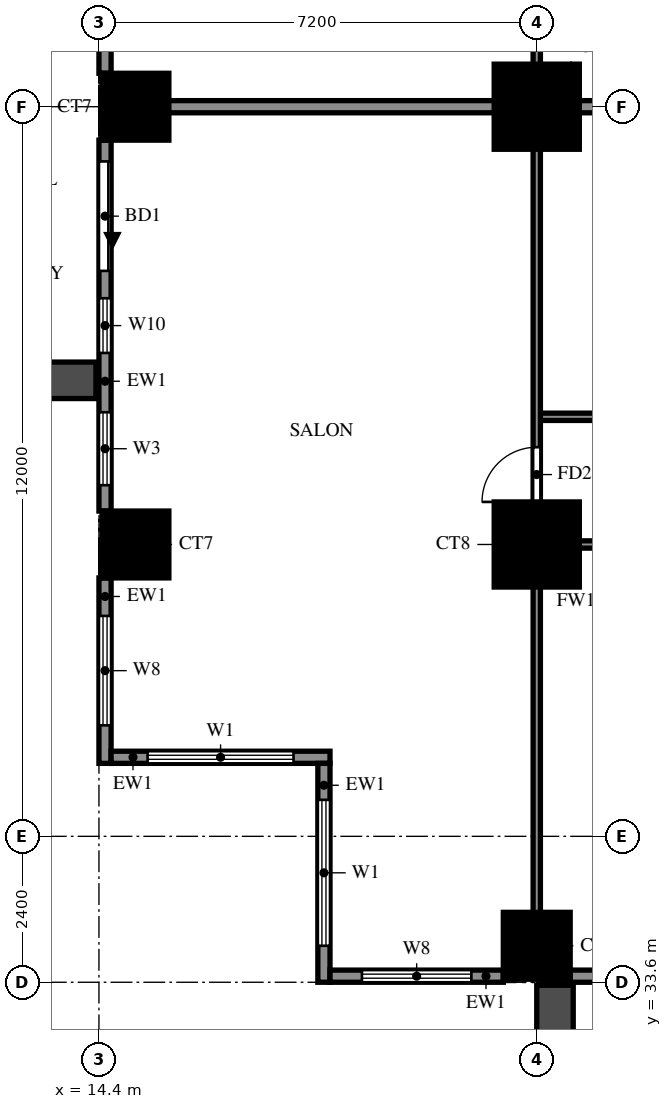
"""IFC4 building model, lengths in metres.
Left out: names, types, materials, properties, quantities, classifications, styles, units other than length and angle.
Written with IfcOpenShell. Run it as: python <this file> out.ifc"""

import sys

from ifc_helpers import new_model, si_unit, direction, frame, frame_2d, origin, origin_2d, place, context, subcontext, project, spatial, rectangle, extrude, source, transform, mapped, element, fill, save


model = new_model("IFC4")
c1 = context("Model", 3, precision=1e-05, world=origin(), true_north=direction((0.0, 1.0)))
c2 = subcontext(c1, "Body", "Model", "MODEL_VIEW")
j1 = project(units=[si_unit("LENGTHUNIT", "METRE"), si_unit("PLANEANGLEUNIT", "RADIAN")], contexts=[c1])
p1 = place(None, origin())
s1 = spatial("IfcSite", under=j1, at=p1, CompositionType="ELEMENT")
p2 = place(p1, origin())
s2 = spatial("IfcBuilding", under=s1, at=p2, CompositionType="ELEMENT")
p3 = place(p2, frame((0.0, 0.0, 44.5)))
s3 = spatial("IfcBuildingStorey", under=s2, at=p3, CompositionType="ELEMENT", Elevation=44.5)
m1 = source(origin(), c2, "Body", "SweptSolid", [
    extrude(rectangle(XDim=1.1, YDim=1.1, at=origin_2d()), origin(), (0.0, 0.0, 1.0), 3.18),
])
for number, where, z_axis, x_axis in (
    (1, (21.6, 34.2, 0.0), (0.0, 0.0, 1.0), (1.0, 0.0, 0.0)),
    (2, (15.0, 40.8, 0.0), (0.0, 0.0, 1.0), (1.0, 0.0, 0.0)),
):
    element("IfcColumn", number, at=place(p3, frame(where, z_axis=z_axis, x_axis=x_axis)), inside=s3, PredefinedType="COLUMN", context=c2, shape_type="MappedRepresentation", body=[
        mapped(m1, transform((0.0, 0.0, 0.0))),
    ])
m2 = source(origin(), c2, "Body", "SweptSolid", [
    extrude(rectangle(XDim=1.4, YDim=1.4, at=origin_2d()), origin(), (0.0, 0.0, 1.0), 3.18),
])
p4 = place(p3, frame((21.6, 40.8, 0.0), z_axis=(0.0, 0.0, 1.0), x_axis=(1.0, 0.0, 0.0)))
e3 = element("IfcColumn", 3, at=p4, inside=s3, PredefinedType="COLUMN", context=c2, shape_type="MappedRepresentation", body=[
    mapped(m2, transform((0.0, 0.0, 0.0))),
])
p5 = place(p3, frame((15.0, 48.0, 0.0), z_axis=(0.0, 0.0, 1.0), x_axis=(1.0, 0.0, 0.0)))
e4 = element("IfcColumn", 4, at=p5, inside=s3, PredefinedType="COLUMN", context=c2, shape_type="MappedRepresentation", body=[
    mapped(m1, transform((0.0, 0.0, 0.0))),
])
p6 = place(p3, frame((21.6, 48.0, 0.0), z_axis=(0.0, 0.0, 1.0), x_axis=(1.0, 0.0, 0.0)))
e5 = element("IfcColumn", 5, at=p6, inside=s3, PredefinedType="COLUMN", context=c2, shape_type="MappedRepresentation", body=[
    mapped(m2, transform((0.0, 0.0, 0.0))),
])
p7 = place(p3, frame((14.5, 54.65, 0.0), z_axis=(0.0, 0.0, 1.0), x_axis=(0.0, -1.0, 0.0)))
e6 = element("IfcWall", 6, at=p7, inside=s3, PredefinedType="SOLIDWALL", context=c2, shape_type="SweptSolid", body=[
    extrude(rectangle(XDim=6.1, YDim=0.2, at=frame_2d((3.05, 0.0))), origin(), (0.0, 0.0, 1.0), 3.18),
])
p8 = place(p7, frame((3.2, 0.0, 0.6)))
e7 = element("IfcOpeningElement", 7, at=p8, cuts=e6, PredefinedType="OPENING", context=c2, shape_type="SweptSolid", body=[
    extrude(rectangle(XDim=0.9, YDim=2.4, at=frame_2d((0.45, 1.2))), frame((0.0, 0.11, 0.0), z_axis=(0.0, -1.0, 0.0), x_axis=(1.0, 0.0, 0.0)), (0.0, 0.0, 1.0), 0.22),
])
p9 = place(p7, frame((0.725, 0.0, 0.6)))
e8 = element("IfcOpeningElement", 8, at=p9, cuts=e6, PredefinedType="OPENING", context=c2, shape_type="SweptSolid", body=[
    extrude(rectangle(XDim=1.8, YDim=2.4, at=frame_2d((0.9, 1.2))), frame((0.0, 0.11, 0.0), z_axis=(0.0, -1.0, 0.0), x_axis=(1.0, 0.0, 0.0)), (0.0, 0.0, 1.0), 0.22),
])
p10 = place(p3, frame((14.5, 47.45, 0.0), z_axis=(0.0, 0.0, 1.0), x_axis=(0.0, -1.0, 0.0)))
e9 = element("IfcWall", 9, at=p10, inside=s3, PredefinedType="SOLIDWALL", context=c2, shape_type="SweptSolid", body=[
    extrude(rectangle(XDim=6.1, YDim=0.2, at=frame_2d((3.05, 0.0))), origin(), (0.0, 0.0, 1.0), 3.18),
])
p11 = place(p10, frame((0.35, 0.0, 0.0)))
e10 = element("IfcOpeningElement", 10, at=p11, cuts=e9, PredefinedType="OPENING", context=c2, shape_type="SweptSolid", body=[
    extrude(rectangle(XDim=1.8, YDim=2.4, at=frame_2d((0.9, 1.2))), frame((0.0, 0.11, 0.0), z_axis=(0.0, -1.0, 0.0), x_axis=(1.0, 0.0, 0.0)), (0.0, 0.0, 1.0), 0.22),
])
p12 = place(p10, frame((2.6, 0.0, 0.6)))
e11 = element("IfcOpeningElement", 11, at=p12, cuts=e9, PredefinedType="OPENING", context=c2, shape_type="SweptSolid", body=[
    extrude(rectangle(XDim=0.9, YDim=2.4, at=frame_2d((0.45, 1.2))), frame((0.0, 0.11, 0.0), z_axis=(0.0, -1.0, 0.0), x_axis=(1.0, 0.0, 0.0)), (0.0, 0.0, 1.0), 0.22),
])
p13 = place(p10, frame((4.475, 0.0, 0.6)))
e12 = element("IfcOpeningElement", 12, at=p13, cuts=e9, PredefinedType="OPENING", context=c2, shape_type="SweptSolid", body=[
    extrude(rectangle(XDim=1.2, YDim=2.4, at=frame_2d((0.6, 1.2))), frame((0.0, 0.11, 0.0), z_axis=(0.0, -1.0, 0.0), x_axis=(1.0, 0.0, 0.0)), (0.0, 0.0, 1.0), 0.22),
])
p14 = place(p3, frame((14.5, 40.25, 0.0), z_axis=(0.0, 0.0, 1.0), x_axis=(0.0, -1.0, 0.0)))
e13 = element("IfcWall", 13, at=p14, inside=s3, PredefinedType="SOLIDWALL", context=c2, shape_type="SweptSolid", body=[
    extrude(rectangle(XDim=3.05, YDim=0.2, at=frame_2d((1.525, 0.0))), origin(), (0.0, 0.0, 1.0), 3.18),
])
p15 = place(p14, frame((0.625, 0.0, 0.6)))
e14 = element("IfcOpeningElement", 14, at=p15, cuts=e13, PredefinedType="OPENING", context=c2, shape_type="SweptSolid", body=[
    extrude(rectangle(XDim=1.8, YDim=2.4, at=frame_2d((0.9, 1.2))), frame((0.0, 0.11, 0.0), z_axis=(0.0, -1.0, 0.0), x_axis=(1.0, 0.0, 0.0)), (0.0, 0.0, 1.0), 0.22),
])
p16 = place(p3, frame((14.6, 37.3, 0.0), z_axis=(0.0, 0.0, 1.0), x_axis=(1.0, 0.0, 0.0)))
e15 = element("IfcWall", 15, at=p16, inside=s3, PredefinedType="SOLIDWALL", context=c2, shape_type="SweptSolid", body=[
    extrude(rectangle(XDim=3.6, YDim=0.2, at=frame_2d((1.8, 0.0))), origin(), (0.0, 0.0, 1.0), 3.18),
])
p17 = place(p16, frame((0.6, 0.0, 0.6)))
e16 = element("IfcOpeningElement", 16, at=p17, cuts=e15, PredefinedType="OPENING", context=c2, shape_type="SweptSolid", body=[
    extrude(rectangle(XDim=2.4, YDim=2.4, at=frame_2d((1.2, 1.2))), frame((0.0, 0.11, 0.0), z_axis=(0.0, -1.0, 0.0), x_axis=(1.0, 0.0, 0.0)), (0.0, 0.0, 1.0), 0.22),
])
p18 = place(p3, frame((18.1, 37.2, 0.0), z_axis=(0.0, 0.0, 1.0), x_axis=(0.0, -1.0, 0.0)))
e17 = element("IfcWall", 17, at=p18, inside=s3, PredefinedType="SOLIDWALL", context=c2, shape_type="SweptSolid", body=[
    extrude(rectangle(XDim=3.6, YDim=0.2, at=frame_2d((1.8, 0.0))), origin(), (0.0, 0.0, 1.0), 3.18),
])
p19 = place(p18, frame((0.6, 0.0, 0.6)))
e18 = element("IfcOpeningElement", 18, at=p19, cuts=e17, PredefinedType="OPENING", context=c2, shape_type="SweptSolid", body=[
    extrude(rectangle(XDim=2.4, YDim=2.4, at=frame_2d((1.2, 1.2))), frame((0.0, 0.11, 0.0), z_axis=(0.0, -1.0, 0.0), x_axis=(1.0, 0.0, 0.0)), (0.0, 0.0, 1.0), 0.22),
])
p20 = place(p3, frame((18.2, 33.7, 0.0), z_axis=(0.0, 0.0, 1.0), x_axis=(1.0, 0.0, 0.0)))
e19 = element("IfcWall", 19, at=p20, inside=s3, PredefinedType="SOLIDWALL", context=c2, shape_type="SweptSolid", body=[
    extrude(rectangle(XDim=2.85, YDim=0.2, at=frame_2d((1.425, 0.0))), origin(), (0.0, 0.0, 1.0), 3.18),
])
p21 = place(p20, frame((0.525, 0.0, 0.6)))
e20 = element("IfcOpeningElement", 20, at=p21, cuts=e19, PredefinedType="OPENING", context=c2, shape_type="SweptSolid", body=[
    extrude(rectangle(XDim=1.8, YDim=2.4, at=frame_2d((0.9, 1.2))), frame((0.0, 0.11, 0.0), z_axis=(0.0, -1.0, 0.0), x_axis=(1.0, 0.0, 0.0)), (0.0, 0.0, 1.0), 0.22),
])
p22 = place(p3, frame((22.15, 33.7, 0.0), z_axis=(0.0, 0.0, 1.0), x_axis=(1.0, 0.0, 0.0)))
e21 = element("IfcWall", 21, at=p22, inside=s3, PredefinedType="SOLIDWALL", context=c2, shape_type="SweptSolid", body=[
    extrude(rectangle(XDim=6.1, YDim=0.2, at=frame_2d((3.05, 0.0))), origin(), (0.0, 0.0, 1.0), 3.18),
])
p23 = place(p22, frame((0.95, 0.0, 0.0)))
e22 = element("IfcOpeningElement", 22, at=p23, cuts=e21, PredefinedType="OPENING", context=c2, shape_type="SweptSolid", body=[
    extrude(rectangle(XDim=1.8, YDim=2.4, at=frame_2d((0.9, 1.2))), frame((0.0, 0.11, 0.0), z_axis=(0.0, -1.0, 0.0), x_axis=(1.0, 0.0, 0.0)), (0.0, 0.0, 1.0), 0.22),
])
p24 = place(p22, frame((4.025, 0.0, 1.5)))
e23 = element("IfcOpeningElement", 23, at=p24, cuts=e21, PredefinedType="OPENING", context=c2, shape_type="SweptSolid", body=[
    extrude(rectangle(XDim=0.9, YDim=0.9, at=frame_2d((0.45, 0.45))), frame((0.0, 0.11, 0.0), z_axis=(0.0, -1.0, 0.0), x_axis=(1.0, 0.0, 0.0)), (0.0, 0.0, 1.0), 0.22),
])
for number, where, z_axis, x_axis in (
    (24, (14.35, 43.5, 0.0), (0.0, 0.0, 1.0), (-1.0, 0.0, 0.0)),
    (25, (21.9, 33.55, 0.0), (0.0, 0.0, 1.0), (0.0, -1.0, 0.0)),
):
    element("IfcWall", number, at=place(p3, frame(where, z_axis=z_axis, x_axis=x_axis)), inside=s3, PredefinedType="SOLIDWALL", context=c2, shape_type="SweptSolid", body=[
        extrude(rectangle(XDim=2.65, YDim=0.6, at=frame_2d((1.325, 0.0))), origin(), (0.0, 0.0, 1.0), 2.85),
    ])
p25 = place(p3, frame((14.525, 48.0, 0.0), z_axis=(0.0, 0.0, 1.0), x_axis=(1.0, 0.0, 0.0)))
e26 = element("IfcWall", 26, at=p25, inside=s3, PredefinedType="SOLIDWALL", context=c2, shape_type="SweptSolid", body=[
    extrude(rectangle(XDim=19.075, YDim=0.2, at=frame_2d((9.538, 0.0))), origin(), (0.0, 0.0, 1.0), 3.18),
])
p26 = place(p3, frame((21.6, 40.8, 0.0), z_axis=(0.0, 0.0, 1.0), x_axis=(1.0, 0.0, 0.0)))
e27 = element("IfcWall", 27, at=p26, inside=s3, PredefinedType="PARTITIONING", context=c2, shape_type="SweptSolid", body=[
    extrude(rectangle(XDim=3.6, YDim=0.12, at=frame_2d((1.8, 0.0))), origin(), (0.0, 0.0, 1.0), 3.18),
])
p27 = place(p26, frame((1.35, 0.0, 0.0)))
e28 = element("IfcOpeningElement", 28, at=p27, cuts=e27, PredefinedType="OPENING", context=c2, shape_type="SweptSolid", body=[
    extrude(rectangle(XDim=0.9, YDim=2.1, at=frame_2d((0.45, 1.05))), frame((0.0, 0.07, 0.0), z_axis=(0.0, -1.0, 0.0), x_axis=(1.0, 0.0, 0.0)), (0.0, 0.0, 1.0), 0.14),
])
p28 = place(p3, frame((21.6, 42.9, 0.0), z_axis=(0.0, 0.0, 1.0), x_axis=(1.0, 0.0, 0.0)))
e29 = element("IfcWall", 29, at=p28, inside=s3, PredefinedType="PARTITIONING", context=c2, shape_type="SweptSolid", body=[
    extrude(rectangle(XDim=14.4, YDim=0.12, at=frame_2d((7.2, 0.0))), origin(), (0.0, 0.0, 1.0), 3.18),
])
p29 = place(p28, frame((2.1, 0.0, 0.0)))
e30 = element("IfcOpeningElement", 30, at=p29, cuts=e29, PredefinedType="OPENING", context=c2, shape_type="SweptSolid", body=[
    extrude(rectangle(XDim=0.9, YDim=2.1, at=frame_2d((0.45, 1.05))), frame((0.0, 0.07, 0.0), z_axis=(0.0, -1.0, 0.0), x_axis=(1.0, 0.0, 0.0)), (0.0, 0.0, 1.0), 0.14),
])
p30 = place(p28, frame((5.85, 0.0, 0.0)))
e31 = element("IfcOpeningElement", 31, at=p30, cuts=e29, PredefinedType="OPENING", context=c2, shape_type="SweptSolid", body=[
    extrude(rectangle(XDim=0.8, YDim=2.1, at=frame_2d((0.4, 1.05))), frame((0.0, 0.07, 0.0), z_axis=(0.0, -1.0, 0.0), x_axis=(1.0, 0.0, 0.0)), (0.0, 0.0, 1.0), 0.14),
])
p31 = place(p28, frame((9.25, 0.0, 0.0)))
e32 = element("IfcOpeningElement", 32, at=p31, cuts=e29, PredefinedType="OPENING", context=c2, shape_type="SweptSolid", body=[
    extrude(rectangle(XDim=0.9, YDim=2.1, at=frame_2d((0.45, 1.05))), frame((0.0, 0.07, 0.0), z_axis=(0.0, -1.0, 0.0), x_axis=(1.0, 0.0, 0.0)), (0.0, 0.0, 1.0), 0.14),
])
p32 = place(p3, frame((21.6, 33.725, 0.0), z_axis=(0.0, 0.0, 1.0), x_axis=(0.0, 1.0, 0.0)))
e33 = element("IfcWall", 33, at=p32, inside=s3, PredefinedType="PARTITIONING", context=c2, shape_type="SweptSolid", body=[
    extrude(rectangle(XDim=35.875, YDim=0.12, at=frame_2d((17.938, 0.0))), origin(), (0.0, 0.0, 1.0), 3.18),
])
p33 = place(p32, frame((7.775, 0.0, 0.0)))
e34 = element("IfcOpeningElement", 34, at=p33, cuts=e33, PredefinedType="OPENING", context=c2, shape_type="SweptSolid", body=[
    extrude(rectangle(XDim=0.9, YDim=2.1, at=frame_2d((0.45, 1.05))), frame((0.0, 0.07, 0.0), z_axis=(0.0, -1.0, 0.0), x_axis=(1.0, 0.0, 0.0)), (0.0, 0.0, 1.0), 0.14),
])
p34 = place(p32, frame((15.625, 0.0, 0.0)))
e35 = element("IfcOpeningElement", 35, at=p34, cuts=e33, PredefinedType="OPENING", context=c2, shape_type="SweptSolid", body=[
    extrude(rectangle(XDim=0.9, YDim=2.1, at=frame_2d((0.45, 1.05))), frame((0.0, 0.07, 0.0), z_axis=(0.0, -1.0, 0.0), x_axis=(1.0, 0.0, 0.0)), (0.0, 0.0, 1.0), 0.14),
])
p35 = place(p32, frame((22.225, 0.0, 0.0)))
e36 = element("IfcOpeningElement", 36, at=p35, cuts=e33, PredefinedType="OPENING", context=c2, shape_type="SweptSolid", body=[
    extrude(rectangle(XDim=1.5, YDim=2.1, at=frame_2d((0.75, 1.05))), frame((0.0, 0.07, 0.0), z_axis=(0.0, -1.0, 0.0), x_axis=(1.0, 0.0, 0.0)), (0.0, 0.0, 1.0), 0.14),
])
p36 = place(p32, frame((26.425, 0.0, 0.0)))
e37 = element("IfcOpeningElement", 37, at=p36, cuts=e33, PredefinedType="OPENING", context=c2, shape_type="SweptSolid", body=[
    extrude(rectangle(XDim=0.9, YDim=2.1, at=frame_2d((0.45, 1.05))), frame((0.0, 0.07, 0.0), z_axis=(0.0, -1.0, 0.0), x_axis=(1.0, 0.0, 0.0)), (0.0, 0.0, 1.0), 0.14),
])
p37 = place(p32, frame((31.825, 0.0, 0.0)))
e38 = element("IfcOpeningElement", 38, at=p37, cuts=e33, PredefinedType="OPENING", context=c2, shape_type="SweptSolid", body=[
    extrude(rectangle(XDim=0.9, YDim=2.1, at=frame_2d((0.45, 1.05))), frame((0.0, 0.07, 0.0), z_axis=(0.0, -1.0, 0.0), x_axis=(1.0, 0.0, 0.0)), (0.0, 0.0, 1.0), 0.14),
])
p38 = place(p11, origin())
e39 = element("IfcDoor", 39, at=p38, inside=s3, OperationType="DOUBLE_DOOR_SLIDING", PredefinedType="DOOR", context=c2, shape_type="SweptSolid", body=[
    extrude(rectangle(XDim=1.8, YDim=2.4, at=frame_2d((0.9, 1.2))), frame((0.0, 0.025, 0.0), z_axis=(0.0, -1.0, 0.0), x_axis=(1.0, 0.0, 0.0)), (0.0, 0.0, 1.0), 0.05),
])
fill(e10, e39)
p39 = place(p12, origin())
e40 = element("IfcWindow", 40, at=p39, inside=s3, PartitioningType="SINGLE_PANEL", PredefinedType="WINDOW", context=c2, shape_type="SweptSolid", body=[
    extrude(rectangle(XDim=0.9, YDim=2.4, at=frame_2d((0.45, 1.2))), frame((0.0, 0.03, 0.0), z_axis=(0.0, -1.0, 0.0), x_axis=(1.0, 0.0, 0.0)), (0.0, 0.0, 1.0), 0.06),
])
fill(e11, e40)
p40 = place(p13, origin())
e41 = element("IfcWindow", 41, at=p40, inside=s3, PartitioningType="SINGLE_PANEL", PredefinedType="WINDOW", context=c2, shape_type="SweptSolid", body=[
    extrude(rectangle(XDim=1.2, YDim=2.4, at=frame_2d((0.6, 1.2))), frame((0.0, 0.03, 0.0), z_axis=(0.0, -1.0, 0.0), x_axis=(1.0, 0.0, 0.0)), (0.0, 0.0, 1.0), 0.06),
])
fill(e12, e41)
p41 = place(p15, origin())
e42 = element("IfcWindow", 42, at=p41, inside=s3, PartitioningType="DOUBLE_PANEL_VERTICAL", PredefinedType="WINDOW", context=c2, shape_type="SweptSolid", body=[
    extrude(rectangle(XDim=1.8, YDim=2.4, at=frame_2d((0.9, 1.2))), frame((0.0, 0.03, 0.0), z_axis=(0.0, -1.0, 0.0), x_axis=(1.0, 0.0, 0.0)), (0.0, 0.0, 1.0), 0.06),
])
fill(e14, e42)
p42 = place(p17, origin())
e43 = element("IfcWindow", 43, at=p42, inside=s3, PartitioningType="DOUBLE_PANEL_VERTICAL", PredefinedType="WINDOW", context=c2, shape_type="SweptSolid", body=[
    extrude(rectangle(XDim=2.4, YDim=2.4, at=frame_2d((1.2, 1.2))), frame((0.0, 0.03, 0.0), z_axis=(0.0, -1.0, 0.0), x_axis=(1.0, 0.0, 0.0)), (0.0, 0.0, 1.0), 0.06),
])
fill(e16, e43)
p43 = place(p19, origin())
e44 = element("IfcWindow", 44, at=p43, inside=s3, PartitioningType="DOUBLE_PANEL_VERTICAL", PredefinedType="WINDOW", context=c2, shape_type="SweptSolid", body=[
    extrude(rectangle(XDim=2.4, YDim=2.4, at=frame_2d((1.2, 1.2))), frame((0.0, 0.03, 0.0), z_axis=(0.0, -1.0, 0.0), x_axis=(1.0, 0.0, 0.0)), (0.0, 0.0, 1.0), 0.06),
])
fill(e18, e44)
p44 = place(p21, origin())
e45 = element("IfcWindow", 45, at=p44, inside=s3, PartitioningType="DOUBLE_PANEL_VERTICAL", PredefinedType="WINDOW", context=c2, shape_type="SweptSolid", body=[
    extrude(rectangle(XDim=1.8, YDim=2.4, at=frame_2d((0.9, 1.2))), frame((0.0, 0.03, 0.0), z_axis=(0.0, -1.0, 0.0), x_axis=(1.0, 0.0, 0.0)), (0.0, 0.0, 1.0), 0.06),
])
fill(e20, e45)
p45 = place(p33, origin())
e46 = element("IfcDoor", 46, at=p45, inside=s3, OperationType="SINGLE_SWING_RIGHT", PredefinedType="DOOR", context=c2, shape_type="SweptSolid", body=[
    extrude(rectangle(XDim=0.9, YDim=2.1, at=frame_2d((0.45, 1.05))), frame((0.0, 0.025, 0.0), z_axis=(0.0, -1.0, 0.0), x_axis=(1.0, 0.0, 0.0)), (0.0, 0.0, 1.0), 0.05),
])
fill(e34, e46)
save(model, sys.argv[1])
